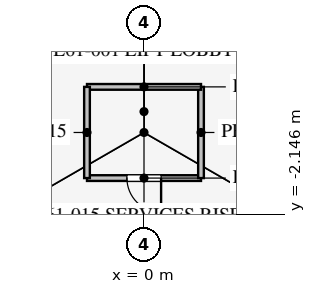
"""IFC4 building model, lengths in metres.
Left out: names, types, materials, properties, quantities, classifications, styles, units other than length and angle.
Written with IfcOpenShell. Run it as: python <this file> out.ifc"""

import sys

from ifc_helpers import new_model, si_unit, direction, frame, frame_2d, origin, place, context, subcontext, project, spatial, rectangle, extrude, element, fill, save


model = new_model("IFC4")
c1 = context("Model", 3, precision=1e-05, world=origin(), true_north=direction((0.0, 1.0)))
c2 = subcontext(c1, "Body", "Model", "MODEL_VIEW")
j1 = project(units=[si_unit("LENGTHUNIT", "METRE"), si_unit("PLANEANGLEUNIT", "RADIAN")], contexts=[c1])
p1 = place(None, origin())
s1 = spatial("IfcSite", under=j1, at=p1, CompositionType="ELEMENT")
p2 = place(p1, origin())
s2 = spatial("IfcBuilding", under=s1, at=p2, CompositionType="ELEMENT")
p3 = place(p2, frame((0.0, 0.0, 265.3)))
s3 = spatial("IfcBuildingStorey", under=s2, at=p3, CompositionType="ELEMENT", Elevation=265.3)
p4 = place(p3, frame((-1.5, -1.2, 0.0), z_axis=(0.0, 0.0, 1.0), x_axis=(1.0, 0.0, 0.0)))
e1 = element("IfcWall", 1, at=p4, inside=s3, PredefinedType="PARTITIONING", context=c2, shape_type="SweptSolid", body=[
    extrude(rectangle(XDim=3.0, YDim=0.15, at=frame_2d((1.5, 0.0))), origin(), (0.0, 0.0, 1.0), 5.8),
])
p5 = place(p4, frame((1.05, 0.0, 0.0)))
e2 = element("IfcOpeningElement", 2, at=p5, cuts=e1, PredefinedType="OPENING", context=c2, shape_type="SweptSolid", body=[
    extrude(rectangle(XDim=0.9, YDim=2.1, at=frame_2d((0.45, 1.05))), frame((0.0, 0.085, 0.0), z_axis=(0.0, -1.0, 0.0), x_axis=(1.0, 0.0, 0.0)), (0.0, 0.0, 1.0), 0.17),
])
p6 = place(p3, frame((1.5, -1.2, 0.0), z_axis=(0.0, 0.0, 1.0), x_axis=(0.0, 1.0, 0.0)))
e3 = element("IfcWall", 3, at=p6, inside=s3, PredefinedType="PARTITIONING", context=c2, shape_type="SweptSolid", body=[
    extrude(rectangle(XDim=2.4, YDim=0.15, at=frame_2d((1.2, 0.0))), origin(), (0.0, 0.0, 1.0), 5.8),
])
p7 = place(p3, frame((1.5, 1.2, 0.0), z_axis=(0.0, 0.0, 1.0), x_axis=(-1.0, 0.0, 0.0)))
e4 = element("IfcWall", 4, at=p7, inside=s3, PredefinedType="PARTITIONING", context=c2, shape_type="SweptSolid", body=[
    extrude(rectangle(XDim=3.0, YDim=0.15, at=frame_2d((1.5, 0.0))), origin(), (0.0, 0.0, 1.0), 5.8),
])
p8 = place(p3, frame((-1.5, 1.2, 0.0), z_axis=(0.0, 0.0, 1.0), x_axis=(0.0, -1.0, 0.0)))
e5 = element("IfcWall", 5, at=p8, inside=s3, PredefinedType="PARTITIONING", context=c2, shape_type="SweptSolid", body=[
    extrude(rectangle(XDim=2.4, YDim=0.15, at=frame_2d((1.2, 0.0))), origin(), (0.0, 0.0, 1.0), 5.8),
])
p9 = place(p5, frame((0.9, 0.0, 0.0), z_axis=(0.0, 0.0, 1.0), x_axis=(-1.0, 0.0, 0.0)))
e6 = element("IfcDoor", 6, at=p9, inside=s3, OperationType="SINGLE_SWING_LEFT", PredefinedType="DOOR", context=c2, shape_type="SweptSolid", body=[
    extrude(rectangle(XDim=0.9, YDim=2.1, at=frame_2d((0.45, 1.05))), frame((0.0, 0.025, 0.0), z_axis=(0.0, -1.0, 0.0), x_axis=(1.0, 0.0, 0.0)), (0.0, 0.0, 1.0), 0.05),
])
fill(e2, e6)
save(model, sys.argv[1])
